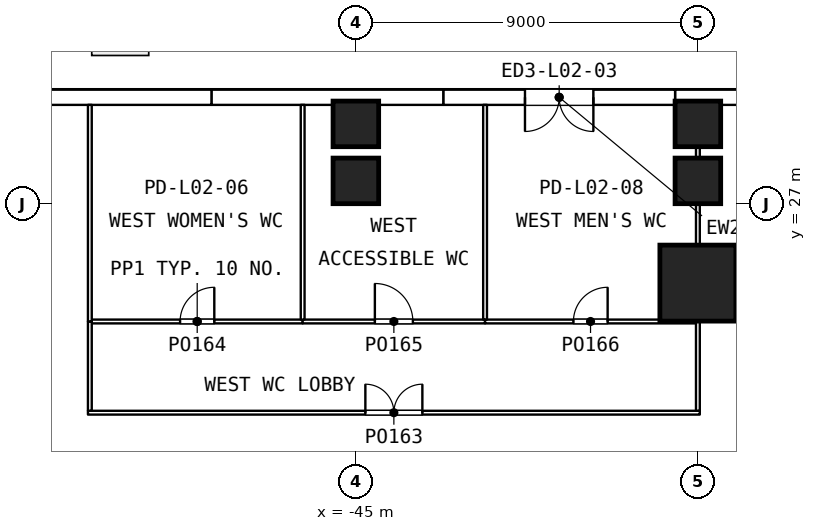
"""IFC4 building model, lengths in metres.
Left out: names, types, materials, properties, quantities, classifications, styles, units other than length and angle.
Written with IfcOpenShell. Run it as: python <this file> out.ifc"""

import sys

from ifc_helpers import new_model, si_unit, direction, frame, frame_2d, origin, origin_2d, place, context, subcontext, project, spatial, rectangle, extrude, element, fill, save


model = new_model("IFC4")
c1 = context("Model", 3, precision=1e-05, world=origin(), true_north=direction((0.0, 1.0)))
c2 = subcontext(c1, "Body", "Model", "MODEL_VIEW")
j1 = project(units=[si_unit("LENGTHUNIT", "METRE"), si_unit("PLANEANGLEUNIT", "RADIAN")], contexts=[c1])
p1 = place(None, origin())
s1 = spatial("IfcSite", under=j1, at=p1, CompositionType="ELEMENT")
p2 = place(p1, origin())
s2 = spatial("IfcBuilding", under=s1, at=p2, CompositionType="ELEMENT")
p3 = place(p2, frame((0.0, 0.0, 12.6)))
s3 = spatial("IfcBuildingStorey", under=s2, at=p3, CompositionType="ELEMENT", Elevation=12.6)
for number, where, z_axis, x_axis in (
    (1, (-45.0, 27.6, 0.0), (0.0, 0.0, 1.0), (1.0, 0.0, 0.0)),
    (2, (-45.0, 29.1, 0.0), (0.0, 0.0, 1.0), (1.0, 0.0, 0.0)),
    (3, (-36.0, 27.6, 0.0), (0.0, 0.0, 1.0), (1.0, 0.0, 0.0)),
    (4, (-36.0, 29.1, 0.0), (0.0, 0.0, 1.0), (1.0, 0.0, 0.0)),
):
    element("IfcColumn", number, at=place(p3, frame(where, z_axis=z_axis, x_axis=x_axis)), inside=s3, PredefinedType="COLUMN", context=c2, shape_type="SweptSolid", body=[
        extrude(rectangle(XDim=1.2, YDim=1.2, at=origin_2d()), origin(), (0.0, 0.0, 1.0), 5.4),
    ])
p4 = place(p3, frame((-36.0, 24.91, 0.0), z_axis=(0.0, 0.0, 1.0), x_axis=(0.0, 1.0, 0.0)))
e5 = element("IfcColumn", 5, at=p4, inside=s3, PredefinedType="COLUMN", context=c2, shape_type="SweptSolid", body=[
    extrude(rectangle(XDim=2.0, YDim=2.0, at=origin_2d()), origin(), (0.0, 0.0, 1.0), 5.4),
])
p5 = place(p3, frame((-30.5, 29.8, 0.0), z_axis=(0.0, 0.0, 1.0), x_axis=(-1.0, 0.0, 0.0)))
e6 = element("IfcWall", 6, at=p5, inside=s3, PredefinedType="SOLIDWALL", context=c2, shape_type="SweptSolid", body=[
    extrude(rectangle(XDim=6.1, YDim=0.4, at=frame_2d((3.05, 0.0))), origin(), (0.0, 0.0, 1.0), 5.1),
])
p6 = place(p5, frame((2.3, 0.0, 1.0)))
e7 = element("IfcOpeningElement", 7, at=p6, cuts=e6, PredefinedType="OPENING", context=c2, shape_type="SweptSolid", body=[
    extrude(rectangle(XDim=1.5, YDim=2.4, at=frame_2d((0.75, 1.2))), frame((0.0, 0.21, 0.0), z_axis=(0.0, -1.0, 0.0), x_axis=(1.0, 0.0, 0.0)), (0.0, 0.0, 1.0), 0.42),
])
p7 = place(p3, frame((-36.6, 29.8, 0.0), z_axis=(0.0, 0.0, 1.0), x_axis=(-1.0, 0.0, 0.0)))
e8 = element("IfcWall", 8, at=p7, inside=s3, PredefinedType="SOLIDWALL", context=c2, shape_type="SweptSolid", body=[
    extrude(rectangle(XDim=6.1, YDim=0.4, at=frame_2d((3.05, 0.0))), origin(), (0.0, 0.0, 1.0), 5.1),
])
p8 = place(p7, frame((2.15, 0.0, 0.0)))
e9 = element("IfcOpeningElement", 9, at=p8, cuts=e8, PredefinedType="OPENING", context=c2, shape_type="SweptSolid", body=[
    extrude(rectangle(XDim=1.8, YDim=2.4, at=frame_2d((0.9, 1.2))), frame((0.0, 0.21, 0.0), z_axis=(0.0, -1.0, 0.0), x_axis=(1.0, 0.0, 0.0)), (0.0, 0.0, 1.0), 0.42),
])
p9 = place(p3, frame((-42.7, 29.8, 0.0), z_axis=(0.0, 0.0, 1.0), x_axis=(-1.0, 0.0, 0.0)))
e10 = element("IfcWall", 10, at=p9, inside=s3, PredefinedType="SOLIDWALL", context=c2, shape_type="SweptSolid", body=[
    extrude(rectangle(XDim=6.1, YDim=0.4, at=frame_2d((3.05, 0.0))), origin(), (0.0, 0.0, 1.0), 5.1),
])
p10 = place(p3, frame((-48.8, 29.8, 0.0), z_axis=(0.0, 0.0, 1.0), x_axis=(-1.0, 0.0, 0.0)))
e11 = element("IfcWall", 11, at=p10, inside=s3, PredefinedType="SOLIDWALL", context=c2, shape_type="SweptSolid", body=[
    extrude(rectangle(XDim=6.1, YDim=0.4, at=frame_2d((3.05, 0.0))), origin(), (0.0, 0.0, 1.0), 5.1),
])
p11 = place(p3, frame((-51.95, 23.9, 0.0), z_axis=(0.0, 0.0, 1.0), x_axis=(1.0, 0.0, 0.0)))
e12 = element("IfcWall", 12, at=p11, inside=s3, PredefinedType="PARTITIONING", context=c2, shape_type="SweptSolid", body=[
    extrude(rectangle(XDim=5.55, YDim=0.1, at=frame_2d((2.775, 0.0))), origin(), (0.0, 0.0, 1.0), 5.1),
])
p12 = place(p11, frame((2.325, 0.0, 0.0)))
e13 = element("IfcOpeningElement", 13, at=p12, cuts=e12, PredefinedType="OPENING", context=c2, shape_type="SweptSolid", body=[
    extrude(rectangle(XDim=0.9, YDim=2.1, at=frame_2d((0.45, 1.05))), frame((0.0, 0.06, 0.0), z_axis=(0.0, -1.0, 0.0), x_axis=(1.0, 0.0, 0.0)), (0.0, 0.0, 1.0), 0.12),
])
p13 = place(p3, frame((-46.4, 23.9, 0.0), z_axis=(0.0, 0.0, 1.0), x_axis=(1.0, 0.0, 0.0)))
e14 = element("IfcWall", 14, at=p13, inside=s3, PredefinedType="PARTITIONING", context=c2, shape_type="SweptSolid", body=[
    extrude(rectangle(XDim=4.8, YDim=0.1, at=frame_2d((2.4, 0.0))), origin(), (0.0, 0.0, 1.0), 5.1),
])
p14 = place(p13, frame((1.9, 0.0, 0.0)))
e15 = element("IfcOpeningElement", 15, at=p14, cuts=e14, PredefinedType="OPENING", context=c2, shape_type="SweptSolid", body=[
    extrude(rectangle(XDim=1.0, YDim=2.1, at=frame_2d((0.5, 1.05))), frame((0.0, 0.06, 0.0), z_axis=(0.0, -1.0, 0.0), x_axis=(1.0, 0.0, 0.0)), (0.0, 0.0, 1.0), 0.12),
])
p15 = place(p3, frame((-41.6, 23.9, 0.0), z_axis=(0.0, 0.0, 1.0), x_axis=(1.0, 0.0, 0.0)))
e16 = element("IfcWall", 16, at=p15, inside=s3, PredefinedType="PARTITIONING", context=c2, shape_type="SweptSolid", body=[
    extrude(rectangle(XDim=5.55, YDim=0.1, at=frame_2d((2.775, 0.0))), origin(), (0.0, 0.0, 1.0), 5.1),
])
p16 = place(p15, frame((2.325, 0.0, 0.0)))
e17 = element("IfcOpeningElement", 17, at=p16, cuts=e16, PredefinedType="OPENING", context=c2, shape_type="SweptSolid", body=[
    extrude(rectangle(XDim=0.9, YDim=2.1, at=frame_2d((0.45, 1.05))), frame((0.0, 0.06, 0.0), z_axis=(0.0, -1.0, 0.0), x_axis=(1.0, 0.0, 0.0)), (0.0, 0.0, 1.0), 0.12),
])
p17 = place(p3, frame((-52.05, 21.5, 0.0), z_axis=(0.0, 0.0, 1.0), x_axis=(1.0, 0.0, 0.0)))
e18 = element("IfcWall", 18, at=p17, inside=s3, PredefinedType="PARTITIONING", context=c2, shape_type="SweptSolid", body=[
    extrude(rectangle(XDim=16.1, YDim=0.1, at=frame_2d((8.05, 0.0))), origin(), (0.0, 0.0, 1.0), 5.1),
])
p18 = place(p17, frame((7.3, 0.0, 0.0)))
e19 = element("IfcOpeningElement", 19, at=p18, cuts=e18, PredefinedType="OPENING", context=c2, shape_type="SweptSolid", body=[
    extrude(rectangle(XDim=1.5, YDim=2.1, at=frame_2d((0.75, 1.05))), frame((0.0, 0.06, 0.0), z_axis=(0.0, -1.0, 0.0), x_axis=(1.0, 0.0, 0.0)), (0.0, 0.0, 1.0), 0.12),
])
p19 = place(p3, frame((-52.0, 21.55, 0.0), z_axis=(0.0, 0.0, 1.0), x_axis=(0.0, 1.0, 0.0)))
e20 = element("IfcWall", 20, at=p19, inside=s3, PredefinedType="PARTITIONING", context=c2, shape_type="SweptSolid", body=[
    extrude(rectangle(XDim=2.35, YDim=0.1, at=frame_2d((1.175, 0.0))), origin(), (0.0, 0.0, 1.0), 5.1),
])
p20 = place(p3, frame((-36.0, 21.55, 0.0), z_axis=(0.0, 0.0, 1.0), x_axis=(0.0, 1.0, 0.0)))
e21 = element("IfcWall", 21, at=p20, inside=s3, PredefinedType="PARTITIONING", context=c2, shape_type="SweptSolid", body=[
    extrude(rectangle(XDim=2.35, YDim=0.1, at=frame_2d((1.175, 0.0))), origin(), (0.0, 0.0, 1.0), 4.31),
])
p21 = place(p3, frame((-46.4, 23.95, 0.0), z_axis=(0.0, 0.0, 1.0), x_axis=(0.0, 1.0, 0.0)))
e22 = element("IfcWall", 22, at=p21, inside=s3, PredefinedType="PARTITIONING", context=c2, shape_type="SweptSolid", body=[
    extrude(rectangle(XDim=5.65, YDim=0.1, at=frame_2d((2.825, 0.0))), origin(), (0.0, 0.0, 1.0), 5.1),
])
p22 = place(p3, frame((-52.0, 23.9, 0.0), z_axis=(0.0, 0.0, 1.0), x_axis=(0.0, 1.0, 0.0)))
e23 = element("IfcWall", 23, at=p22, inside=s3, PredefinedType="PARTITIONING", context=c2, shape_type="SweptSolid", body=[
    extrude(rectangle(XDim=5.7, YDim=0.1, at=frame_2d((2.85, 0.0))), origin(), (0.0, 0.0, 1.0), 5.1),
])
p23 = place(p3, frame((-41.6, 23.95, 0.0), z_axis=(0.0, 0.0, 1.0), x_axis=(0.0, 1.0, 0.0)))
e24 = element("IfcWall", 24, at=p23, inside=s3, PredefinedType="PARTITIONING", context=c2, shape_type="SweptSolid", body=[
    extrude(rectangle(XDim=5.65, YDim=0.1, at=frame_2d((2.825, 0.0))), origin(), (0.0, 0.0, 1.0), 5.1),
])
p24 = place(p3, frame((-36.0, 23.9, 0.0), z_axis=(0.0, 0.0, 1.0), x_axis=(0.0, 1.0, 0.0)))
e25 = element("IfcWall", 25, at=p24, inside=s3, PredefinedType="PARTITIONING", context=c2, shape_type="SweptSolid", body=[
    extrude(rectangle(XDim=5.7, YDim=0.1, at=frame_2d((2.85, 0.0))), origin(), (0.0, 0.0, 1.0), 4.31),
])
p25 = place(p8, origin())
e26 = element("IfcDoor", 26, at=p25, inside=s3, OperationType="SINGLE_SWING_LEFT", PredefinedType="DOOR", context=c2, shape_type="SweptSolid", body=[
    extrude(rectangle(XDim=1.8, YDim=2.4, at=frame_2d((0.9, 1.2))), frame((0.0, 0.025, 0.0), z_axis=(0.0, -1.0, 0.0), x_axis=(1.0, 0.0, 0.0)), (0.0, 0.0, 1.0), 0.05),
])
fill(e9, e26)
p26 = place(p18, origin())
e27 = element("IfcDoor", 27, at=p26, inside=s3, OperationType="DOUBLE_DOOR_DOUBLE_SWING", PredefinedType="DOOR", context=c2, shape_type="SweptSolid", body=[
    extrude(rectangle(XDim=1.5, YDim=2.1, at=frame_2d((0.75, 1.05))), frame((0.0, 0.025, 0.0), z_axis=(0.0, -1.0, 0.0), x_axis=(1.0, 0.0, 0.0)), (0.0, 0.0, 1.0), 0.05),
])
fill(e19, e27)
p27 = place(p12, origin())
e28 = element("IfcDoor", 28, at=p27, inside=s3, OperationType="SINGLE_SWING_RIGHT", PredefinedType="DOOR", context=c2, shape_type="SweptSolid", body=[
    extrude(rectangle(XDim=0.9, YDim=2.1, at=frame_2d((0.45, 1.05))), frame((0.0, 0.025, 0.0), z_axis=(0.0, -1.0, 0.0), x_axis=(1.0, 0.0, 0.0)), (0.0, 0.0, 1.0), 0.05),
])
fill(e13, e28)
p28 = place(p14, origin())
e29 = element("IfcDoor", 29, at=p28, inside=s3, OperationType="SINGLE_SWING_LEFT", PredefinedType="DOOR", context=c2, shape_type="SweptSolid", body=[
    extrude(rectangle(XDim=1.0, YDim=2.1, at=frame_2d((0.5, 1.05))), frame((0.0, 0.025, 0.0), z_axis=(0.0, -1.0, 0.0), x_axis=(1.0, 0.0, 0.0)), (0.0, 0.0, 1.0), 0.05),
])
fill(e15, e29)
p29 = place(p16, origin())
e30 = element("IfcDoor", 30, at=p29, inside=s3, OperationType="SINGLE_SWING_RIGHT", PredefinedType="DOOR", context=c2, shape_type="SweptSolid", body=[
    extrude(rectangle(XDim=0.9, YDim=2.1, at=frame_2d((0.45, 1.05))), frame((0.0, 0.025, 0.0), z_axis=(0.0, -1.0, 0.0), x_axis=(1.0, 0.0, 0.0)), (0.0, 0.0, 1.0), 0.05),
])
fill(e17, e30)
save(model, sys.argv[1])
